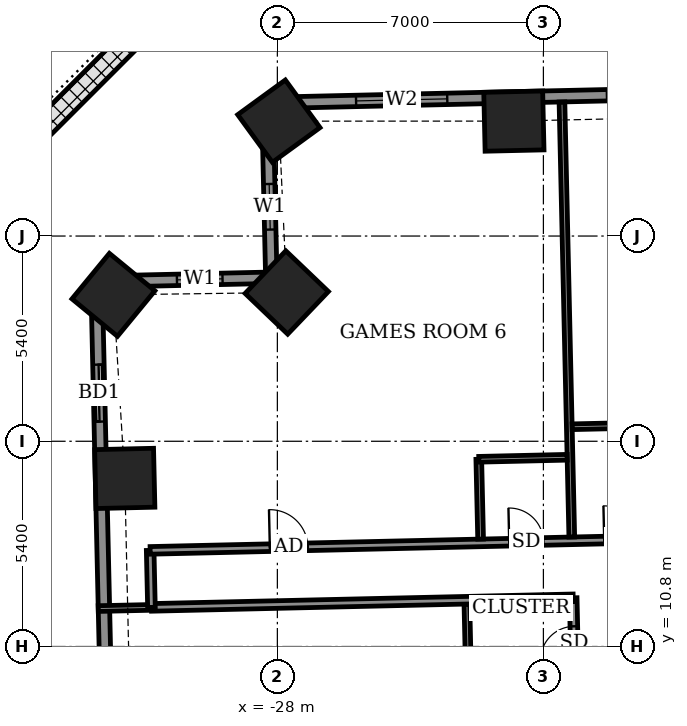
"""IFC4 building model, lengths in metres.
Left out: names, types, materials, properties, quantities, classifications, styles, units other than length and angle.
Written with IfcOpenShell. Run it as: python <this file> out.ifc"""

import sys

from ifc_helpers import new_model, si_unit, direction, frame, frame_2d, origin, origin_2d, place, context, subcontext, project, spatial, rectangle, extrude, element, fill, save


model = new_model("IFC4")
c1 = context("Model", 3, precision=1e-05, world=origin(), true_north=direction((0.0, 1.0)))
c2 = subcontext(c1, "Body", "Model", "MODEL_VIEW")
j1 = project(units=[si_unit("LENGTHUNIT", "METRE"), si_unit("PLANEANGLEUNIT", "RADIAN")], contexts=[c1])
p1 = place(None, origin())
s1 = spatial("IfcSite", under=j1, at=p1, CompositionType="ELEMENT")
p2 = place(p1, origin())
s2 = spatial("IfcBuilding", under=s1, at=p2, CompositionType="ELEMENT")
p3 = place(p2, frame((0.0, 0.0, 29.5)))
s3 = spatial("IfcBuildingStorey", under=s2, at=p3, CompositionType="ELEMENT", Elevation=29.5)
for number, where, z_axis, x_axis in (
    (1, (-21.776, 24.624, -0.55), (0.0, 0.0, 1.0), (-1.0, -0.023, 0.0)),
    (2, (-27.961, 24.623, -0.55), (0.0, 0.0, 1.0), (-0.808, -0.589, 0.0)),
    (3, (-27.753, 20.115, -0.55), (0.0, 0.0, 1.0), (-0.691, -0.723, 0.0)),
    (4, (-32.313, 20.053, -0.55), (0.0, 0.0, 1.0), (-0.635, -0.772, 0.0)),
    (5, (-32.015, 15.223, -0.55), (0.0, 0.0, 1.0), (0.023, -1.0, 0.0)),
):
    element("IfcColumn", number, at=place(p3, frame(where, z_axis=z_axis, x_axis=x_axis)), inside=s3, PredefinedType="COLUMN", context=c2, shape_type="SweptSolid", body=[
        extrude(rectangle(XDim=1.55, YDim=1.55, at=origin_2d()), origin(), (0.0, 0.0, 1.0), 4.6),
    ])
p4 = place(p3, frame((24.423, 26.298, 0.0), z_axis=(0.0, 0.0, 1.0), x_axis=(-0.999742433108, -0.022695097355, 0.0)))
e6 = element("IfcWall", 6, at=p4, inside=s3, PredefinedType="SOLIDWALL", context=c2, shape_type="SweptSolid", body=[
    extrude(rectangle(XDim=52.701, YDim=0.3, at=frame_2d((26.35, 0.0))), origin(), (0.0, 0.0, 1.0), 4.05),
])
p5 = place(p4, frame((2.757, 0.0, 0.0)))
e7 = element("IfcOpeningElement", 7, at=p5, cuts=e6, PredefinedType="OPENING", context=c2, shape_type="SweptSolid", body=[
    extrude(rectangle(XDim=1.5, YDim=2.4, at=frame_2d((0.75, 1.2))), frame((0.0, 0.16, 0.0), z_axis=(0.0, -1.0, 0.0), x_axis=(1.0, 0.0, 0.0)), (0.0, 0.0, 1.0), 0.32),
])
p6 = place(p4, frame((8.937, 0.0, 0.9)))
e8 = element("IfcOpeningElement", 8, at=p6, cuts=e6, PredefinedType="OPENING", context=c2, shape_type="SweptSolid", body=[
    extrude(rectangle(XDim=2.4, YDim=1.5, at=frame_2d((1.2, 0.75))), frame((0.0, 0.16, 0.0), z_axis=(0.0, -1.0, 0.0), x_axis=(1.0, 0.0, 0.0)), (0.0, 0.0, 1.0), 0.32),
])
p7 = place(p4, frame((16.675, 0.0, 0.0)))
e9 = element("IfcOpeningElement", 9, at=p7, cuts=e6, PredefinedType="OPENING", context=c2, shape_type="SweptSolid", body=[
    extrude(rectangle(XDim=1.5, YDim=2.4, at=frame_2d((0.75, 1.2))), frame((0.0, 0.16, 0.0), z_axis=(0.0, -1.0, 0.0), x_axis=(1.0, 0.0, 0.0)), (0.0, 0.0, 1.0), 0.32),
])
p8 = place(p4, frame((22.5, 0.0, 0.0)))
e10 = element("IfcOpeningElement", 10, at=p8, cuts=e6, PredefinedType="OPENING", context=c2, shape_type="SweptSolid", body=[
    extrude(rectangle(XDim=1.5, YDim=2.4, at=frame_2d((0.75, 1.2))), frame((0.0, 0.16, 0.0), z_axis=(0.0, -1.0, 0.0), x_axis=(1.0, 0.0, 0.0)), (0.0, 0.0, 1.0), 0.32),
])
p9 = place(p4, frame((28.113, 0.0, 0.0)))
e11 = element("IfcOpeningElement", 11, at=p9, cuts=e6, PredefinedType="OPENING", context=c2, shape_type="SweptSolid", body=[
    extrude(rectangle(XDim=1.5, YDim=2.4, at=frame_2d((0.75, 1.2))), frame((0.0, 0.16, 0.0), z_axis=(0.0, -1.0, 0.0), x_axis=(1.0, 0.0, 0.0)), (0.0, 0.0, 1.0), 0.32),
])
p10 = place(p4, frame((34.1, 0.0, 0.9)))
e12 = element("IfcOpeningElement", 12, at=p10, cuts=e6, PredefinedType="OPENING", context=c2, shape_type="SweptSolid", body=[
    extrude(rectangle(XDim=2.4, YDim=1.5, at=frame_2d((1.2, 0.75))), frame((0.0, 0.16, 0.0), z_axis=(0.0, -1.0, 0.0), x_axis=(1.0, 0.0, 0.0)), (0.0, 0.0, 1.0), 0.32),
])
p11 = place(p4, frame((41.363, 0.0, 0.9)))
e13 = element("IfcOpeningElement", 13, at=p11, cuts=e6, PredefinedType="OPENING", context=c2, shape_type="SweptSolid", body=[
    extrude(rectangle(XDim=2.4, YDim=1.5, at=frame_2d((1.2, 0.75))), frame((0.0, 0.16, 0.0), z_axis=(0.0, -1.0, 0.0), x_axis=(1.0, 0.0, 0.0)), (0.0, 0.0, 1.0), 0.32),
])
p12 = place(p4, frame((47.965, 0.0, 0.9)))
e14 = element("IfcOpeningElement", 14, at=p12, cuts=e6, PredefinedType="OPENING", context=c2, shape_type="SweptSolid", body=[
    extrude(rectangle(XDim=2.4, YDim=1.5, at=frame_2d((1.2, 0.75))), frame((0.0, 0.16, 0.0), z_axis=(0.0, -1.0, 0.0), x_axis=(1.0, 0.0, 0.0)), (0.0, 0.0, 1.0), 0.32),
])
p13 = place(p3, frame((-28.264, 25.102, 0.0), z_axis=(0.0, 0.0, 1.0), x_axis=(0.022820258049, -0.999739584003, 0.0)))
e15 = element("IfcWall", 15, at=p13, inside=s3, PredefinedType="SOLIDWALL", context=c2, shape_type="SweptSolid", body=[
    extrude(rectangle(XDim=4.6, YDim=0.3, at=frame_2d((2.3, 0.0))), origin(), (0.0, 0.0, 1.0), 3.55),
])
p14 = place(p13, frame((2.133, 0.0, 0.9)))
e16 = element("IfcOpeningElement", 16, at=p14, cuts=e15, PredefinedType="OPENING", context=c2, shape_type="SweptSolid", body=[
    extrude(rectangle(XDim=1.2, YDim=1.5, at=frame_2d((0.6, 0.75))), frame((0.0, 0.16, 0.0), z_axis=(0.0, -1.0, 0.0), x_axis=(1.0, 0.0, 0.0)), (0.0, 0.0, 1.0), 0.32),
])
p15 = place(p3, frame((-28.159, 20.503, 0.0), z_axis=(0.0, 0.0, 1.0), x_axis=(-0.999744404568, -0.02260808559, 0.0)))
e17 = element("IfcWall", 17, at=p15, inside=s3, PredefinedType="SOLIDWALL", context=c2, shape_type="SweptSolid", body=[
    extrude(rectangle(XDim=4.6, YDim=0.3, at=frame_2d((2.3, 0.0))), origin(), (0.0, 0.0, 1.0), 4.05),
])
p16 = place(p15, frame((1.284, 0.0, 0.9)))
e18 = element("IfcOpeningElement", 18, at=p16, cuts=e17, PredefinedType="OPENING", context=c2, shape_type="SweptSolid", body=[
    extrude(rectangle(XDim=1.2, YDim=1.5, at=frame_2d((0.6, 0.75))), frame((0.0, 0.16, 0.0), z_axis=(0.0, -1.0, 0.0), x_axis=(1.0, 0.0, 0.0)), (0.0, 0.0, 1.0), 0.32),
])
p17 = place(p3, frame((-32.758, 20.399, 0.0), z_axis=(0.0, 0.0, 1.0), x_axis=(0.022668485183, -0.999743036875, 0.0)))
e19 = element("IfcWall", 19, at=p17, inside=s3, PredefinedType="SOLIDWALL", context=c2, shape_type="SweptSolid", body=[
    extrude(rectangle(XDim=15.929, YDim=0.3, at=frame_2d((7.964, 0.0))), origin(), (0.0, 0.0, 1.0), 4.05),
])
p18 = place(p17, frame((2.183, 0.0, 0.0)))
e20 = element("IfcOpeningElement", 20, at=p18, cuts=e19, PredefinedType="OPENING", context=c2, shape_type="SweptSolid", body=[
    extrude(rectangle(XDim=1.5, YDim=2.4, at=frame_2d((0.75, 1.2))), frame((0.0, 0.16, 0.0), z_axis=(0.0, -1.0, 0.0), x_axis=(1.0, 0.0, 0.0)), (0.0, 0.0, 1.0), 0.32),
])
p19 = place(p17, frame((12.004, 0.0, 0.9)))
e21 = element("IfcOpeningElement", 21, at=p19, cuts=e19, PredefinedType="OPENING", context=c2, shape_type="SweptSolid", body=[
    extrude(rectangle(XDim=2.4, YDim=1.5, at=frame_2d((1.2, 0.75))), frame((0.0, 0.16, 0.0), z_axis=(0.0, -1.0, 0.0), x_axis=(1.0, 0.0, 0.0)), (0.0, 0.0, 1.0), 0.32),
])
p20 = place(p3, frame((-33.918, 7.62, 0.0), z_axis=(0.0, 0.0, 1.0), x_axis=(-0.022666865795, 0.999743073592, 0.0)))
e22 = element("IfcWall", 22, at=p20, inside=s3, PredefinedType="USERDEFINED", context=c2, shape_type="SweptSolid", body=[
    extrude(rectangle(XDim=5.999, YDim=0.55, at=frame_2d((3.0, 0.0))), origin(), (0.0, 0.0, 1.0), 0.8),
])
p21 = place(p3, frame((-35.513, 23.1, 0.0), z_axis=(0.0, 0.0, 1.0), x_axis=(0.707106781187, 0.707106781187, 0.0)))
e23 = element("IfcWall", 23, at=p21, inside=s3, PredefinedType="USERDEFINED", context=c2, shape_type="SweptSolid", body=[
    extrude(rectangle(XDim=10.201, YDim=0.55, at=frame_2d((5.1, 0.0))), origin(), (0.0, 0.0, 1.0), 0.8),
])
p22 = place(p3, frame((-19.589, -15.562, 0.0), z_axis=(0.0, 0.0, 1.0), x_axis=(-0.02267447203, 0.999742901109, 0.0)))
e24 = element("IfcWall", 24, at=p22, inside=s3, PredefinedType="PARTITIONING", context=c2, shape_type="SweptSolid", body=[
    extrude(rectangle(XDim=27.65, YDim=0.2, at=frame_2d((13.825, 0.0))), origin(), (0.0, 0.0, 1.0), 4.05),
])
p23 = place(p22, frame((22.313, 0.0, 0.0)))
e25 = element("IfcOpeningElement", 25, at=p23, cuts=e24, PredefinedType="OPENING", context=c2, shape_type="SweptSolid", body=[
    extrude(rectangle(XDim=1.0, YDim=2.1, at=frame_2d((0.5, 1.05))), frame((0.0, 0.11, 0.0), z_axis=(0.0, -1.0, 0.0), x_axis=(1.0, 0.0, 0.0)), (0.0, 0.0, 1.0), 0.22),
])
p24 = place(p22, frame((26.0, 0.0, 0.0)))
e26 = element("IfcOpeningElement", 26, at=p24, cuts=e24, PredefinedType="OPENING", context=c2, shape_type="SweptSolid", body=[
    extrude(rectangle(XDim=0.9, YDim=2.1, at=frame_2d((0.45, 1.05))), frame((0.0, 0.11, 0.0), z_axis=(0.0, -1.0, 0.0), x_axis=(1.0, 0.0, 0.0)), (0.0, 0.0, 1.0), 0.22),
])
p25 = place(p22, frame((17.817, 0.0, 0.0)))
e27 = element("IfcOpeningElement", 27, at=p25, cuts=e24, PredefinedType="OPENING", context=c2, shape_type="SweptSolid", body=[
    extrude(rectangle(XDim=1.0, YDim=2.1, at=frame_2d((0.5, 1.05))), frame((0.0, 0.11, 0.0), z_axis=(0.0, -1.0, 0.0), x_axis=(1.0, 0.0, 0.0)), (0.0, 0.0, 1.0), 0.22),
])
p26 = place(p22, frame((12.1, 0.0, 0.0)))
e28 = element("IfcOpeningElement", 28, at=p26, cuts=e24, PredefinedType="OPENING", context=c2, shape_type="SweptSolid", body=[
    extrude(rectangle(XDim=1.0, YDim=2.1, at=frame_2d((0.5, 1.05))), frame((0.0, 0.11, 0.0), z_axis=(0.0, -1.0, 0.0), x_axis=(1.0, 0.0, 0.0)), (0.0, 0.0, 1.0), 0.22),
])
p27 = place(p22, frame((14.625, 0.0, 0.0)))
e29 = element("IfcOpeningElement", 29, at=p27, cuts=e24, PredefinedType="OPENING", context=c2, shape_type="SweptSolid", body=[
    extrude(rectangle(XDim=0.9, YDim=2.1, at=frame_2d((0.45, 1.05))), frame((0.0, 0.11, 0.0), z_axis=(0.0, -1.0, 0.0), x_axis=(1.0, 0.0, 0.0)), (0.0, 0.0, 1.0), 0.22),
])
p28 = place(p22, frame((9.825, 0.0, 0.0)))
e30 = element("IfcOpeningElement", 30, at=p28, cuts=e24, PredefinedType="OPENING", context=c2, shape_type="SweptSolid", body=[
    extrude(rectangle(XDim=1.0, YDim=2.1, at=frame_2d((0.5, 1.05))), frame((0.0, 0.11, 0.0), z_axis=(0.0, -1.0, 0.0), x_axis=(1.0, 0.0, 0.0)), (0.0, 0.0, 1.0), 0.22),
])
p29 = place(p22, frame((7.475, 0.0, 0.0)))
e31 = element("IfcOpeningElement", 31, at=p29, cuts=e24, PredefinedType="OPENING", context=c2, shape_type="SweptSolid", body=[
    extrude(rectangle(XDim=0.9, YDim=2.1, at=frame_2d((0.45, 1.05))), frame((0.0, 0.11, 0.0), z_axis=(0.0, -1.0, 0.0), x_axis=(1.0, 0.0, 0.0)), (0.0, 0.0, 1.0), 0.22),
])
p30 = place(p22, frame((1.612, 0.0, 0.0)))
e32 = element("IfcOpeningElement", 32, at=p30, cuts=e24, PredefinedType="OPENING", context=c2, shape_type="SweptSolid", body=[
    extrude(rectangle(XDim=1.0, YDim=2.1, at=frame_2d((0.5, 1.05))), frame((0.0, 0.11, 0.0), z_axis=(0.0, -1.0, 0.0), x_axis=(1.0, 0.0, 0.0)), (0.0, 0.0, 1.0), 0.22),
])
p31 = place(p22, frame((4.975, 0.0, 0.0)))
e33 = element("IfcOpeningElement", 33, at=p31, cuts=e24, PredefinedType="OPENING", context=c2, shape_type="SweptSolid", body=[
    extrude(rectangle(XDim=0.9, YDim=2.1, at=frame_2d((0.45, 1.05))), frame((0.0, 0.11, 0.0), z_axis=(0.0, -1.0, 0.0), x_axis=(1.0, 0.0, 0.0)), (0.0, 0.0, 1.0), 0.22),
])
p32 = place(p3, frame((-22.961, 9.618, 0.0), z_axis=(0.0, 0.0, 1.0), x_axis=(-0.022603288534, 0.999744513037, 0.0)))
e34 = element("IfcWall", 34, at=p32, inside=s3, PredefinedType="PARTITIONING", context=c2, shape_type="SweptSolid", body=[
    extrude(rectangle(XDim=2.301, YDim=0.15, at=frame_2d((1.15, 0.0))), origin(), (0.0, 0.0, 1.0), 4.05),
])
p33 = place(p3, frame((-32.713, 11.798, 0.0), z_axis=(0.0, 0.0, 1.0), x_axis=(0.999756172383, 0.022081571112, 0.0)))
e35 = element("IfcWall", 35, at=p33, inside=s3, PredefinedType="PARTITIONING", context=c2, shape_type="SweptSolid", body=[
    extrude(rectangle(XDim=1.404, YDim=0.15, at=frame_2d((0.702, 0.0))), origin(), (0.0, 0.0, 1.0), 3.55),
])
p34 = place(p3, frame((-31.313, 11.829, 0.0), z_axis=(0.0, 0.0, 1.0), x_axis=(0.999742346277, 0.022698921993, 0.0)))
e36 = element("IfcWall", 36, at=p34, inside=s3, PredefinedType="PARTITIONING", context=c2, shape_type="SweptSolid", body=[
    extrude(rectangle(XDim=11.1, YDim=0.2, at=frame_2d((5.55, 0.0))), origin(), (0.0, 0.0, 1.0), 4.05),
])
p35 = place(p3, frame((-31.313, 11.829, 0.0), z_axis=(0.0, 0.0, 1.0), x_axis=(-0.022617910375, 0.999744182344, 0.0)))
e37 = element("IfcWall", 37, at=p35, inside=s3, PredefinedType="PARTITIONING", context=c2, shape_type="SweptSolid", body=[
    extrude(rectangle(XDim=1.5, YDim=0.2, at=frame_2d((0.75, 0.0))), origin(), (0.0, 0.0, 1.0), 4.05),
])
p36 = place(p3, frame((-31.347, 13.329, 0.0), z_axis=(0.0, 0.0, 1.0), x_axis=(0.999742613079, 0.022687168058, 0.0)))
e38 = element("IfcWall", 38, at=p36, inside=s3, PredefinedType="PARTITIONING", context=c2, shape_type="SweptSolid", body=[
    extrude(rectangle(XDim=58.799, YDim=0.2, at=frame_2d((29.399, 0.0))), origin(), (0.0, 0.0, 1.0), 4.05),
])
p37 = place(p36, frame((55.05, 0.0, 0.0)))
e39 = element("IfcOpeningElement", 39, at=p37, cuts=e38, PredefinedType="OPENING", context=c2, shape_type="SweptSolid", body=[
    extrude(rectangle(XDim=1.0, YDim=2.1, at=frame_2d((0.5, 1.05))), frame((0.0, 0.11, 0.0), z_axis=(0.0, -1.0, 0.0), x_axis=(1.0, 0.0, 0.0)), (0.0, 0.0, 1.0), 0.22),
])
p38 = place(p36, frame((49.15, 0.0, 0.0)))
e40 = element("IfcOpeningElement", 40, at=p38, cuts=e38, PredefinedType="OPENING", context=c2, shape_type="SweptSolid", body=[
    extrude(rectangle(XDim=0.9, YDim=2.1, at=frame_2d((0.45, 1.05))), frame((0.0, 0.11, 0.0), z_axis=(0.0, -1.0, 0.0), x_axis=(1.0, 0.0, 0.0)), (0.0, 0.0, 1.0), 0.22),
])
p39 = place(p36, frame((42.55, 0.0, 0.0)))
e41 = element("IfcOpeningElement", 41, at=p39, cuts=e38, PredefinedType="OPENING", context=c2, shape_type="SweptSolid", body=[
    extrude(rectangle(XDim=1.0, YDim=2.1, at=frame_2d((0.5, 1.05))), frame((0.0, 0.11, 0.0), z_axis=(0.0, -1.0, 0.0), x_axis=(1.0, 0.0, 0.0)), (0.0, 0.0, 1.0), 0.22),
])
p40 = place(p36, frame((46.55, 0.0, 0.0)))
e42 = element("IfcOpeningElement", 42, at=p40, cuts=e38, PredefinedType="OPENING", context=c2, shape_type="SweptSolid", body=[
    extrude(rectangle(XDim=0.9, YDim=2.1, at=frame_2d((0.45, 1.05))), frame((0.0, 0.11, 0.0), z_axis=(0.0, -1.0, 0.0), x_axis=(1.0, 0.0, 0.0)), (0.0, 0.0, 1.0), 0.22),
])
p41 = place(p36, frame((38.625, 0.0, 0.0)))
e43 = element("IfcOpeningElement", 43, at=p41, cuts=e38, PredefinedType="OPENING", context=c2, shape_type="SweptSolid", body=[
    extrude(rectangle(XDim=0.9, YDim=2.1, at=frame_2d((0.45, 1.05))), frame((0.0, 0.11, 0.0), z_axis=(0.0, -1.0, 0.0), x_axis=(1.0, 0.0, 0.0)), (0.0, 0.0, 1.0), 0.22),
])
p42 = place(p36, frame((31.15, 0.0, 0.0)))
e44 = element("IfcOpeningElement", 44, at=p42, cuts=e38, PredefinedType="OPENING", context=c2, shape_type="SweptSolid", body=[
    extrude(rectangle(XDim=0.9, YDim=2.1, at=frame_2d((0.45, 1.05))), frame((0.0, 0.11, 0.0), z_axis=(0.0, -1.0, 0.0), x_axis=(1.0, 0.0, 0.0)), (0.0, 0.0, 1.0), 0.22),
])
p43 = place(p36, frame((28.475, 0.0, 0.0)))
e45 = element("IfcOpeningElement", 45, at=p43, cuts=e38, PredefinedType="OPENING", context=c2, shape_type="SweptSolid", body=[
    extrude(rectangle(XDim=0.9, YDim=2.1, at=frame_2d((0.45, 1.05))), frame((0.0, 0.11, 0.0), z_axis=(0.0, -1.0, 0.0), x_axis=(1.0, 0.0, 0.0)), (0.0, 0.0, 1.0), 0.22),
])
p44 = place(p36, frame((21.6, 0.0, 0.0)))
e46 = element("IfcOpeningElement", 46, at=p44, cuts=e38, PredefinedType="OPENING", context=c2, shape_type="SweptSolid", body=[
    extrude(rectangle(XDim=1.0, YDim=2.1, at=frame_2d((0.5, 1.05))), frame((0.0, 0.11, 0.0), z_axis=(0.0, -1.0, 0.0), x_axis=(1.0, 0.0, 0.0)), (0.0, 0.0, 1.0), 0.22),
])
p45 = place(p36, frame((15.85, 0.0, 0.0)))
e47 = element("IfcOpeningElement", 47, at=p45, cuts=e38, PredefinedType="OPENING", context=c2, shape_type="SweptSolid", body=[
    extrude(rectangle(XDim=1.0, YDim=2.1, at=frame_2d((0.5, 1.05))), frame((0.0, 0.11, 0.0), z_axis=(0.0, -1.0, 0.0), x_axis=(1.0, 0.0, 0.0)), (0.0, 0.0, 1.0), 0.22),
])
p46 = place(p36, frame((11.95, 0.0, 0.0)))
e48 = element("IfcOpeningElement", 48, at=p46, cuts=e38, PredefinedType="OPENING", context=c2, shape_type="SweptSolid", body=[
    extrude(rectangle(XDim=0.9, YDim=2.1, at=frame_2d((0.45, 1.05))), frame((0.0, 0.11, 0.0), z_axis=(0.0, -1.0, 0.0), x_axis=(1.0, 0.0, 0.0)), (0.0, 0.0, 1.0), 0.22),
])
p47 = place(p36, frame((3.15, 0.0, 0.0)))
e49 = element("IfcOpeningElement", 49, at=p47, cuts=e38, PredefinedType="OPENING", context=c2, shape_type="SweptSolid", body=[
    extrude(rectangle(XDim=1.0, YDim=2.1, at=frame_2d((0.5, 1.05))), frame((0.0, 0.11, 0.0), z_axis=(0.0, -1.0, 0.0), x_axis=(1.0, 0.0, 0.0)), (0.0, 0.0, 1.0), 0.22),
])
p48 = place(p36, frame((9.45, 0.0, 0.0)))
e50 = element("IfcOpeningElement", 50, at=p48, cuts=e38, PredefinedType="OPENING", context=c2, shape_type="SweptSolid", body=[
    extrude(rectangle(XDim=0.9, YDim=2.1, at=frame_2d((0.45, 1.05))), frame((0.0, 0.11, 0.0), z_axis=(0.0, -1.0, 0.0), x_axis=(1.0, 0.0, 0.0)), (0.0, 0.0, 1.0), 0.22),
])
p49 = place(p3, frame((-22.652, 13.626, 0.0), z_axis=(0.0, 0.0, 1.0), x_axis=(-0.022779486249, 0.999740513837, 0.0)))
e51 = element("IfcWall", 51, at=p49, inside=s3, PredefinedType="PARTITIONING", context=c2, shape_type="SweptSolid", body=[
    extrude(rectangle(XDim=2.101, YDim=0.15, at=frame_2d((1.05, 0.0))), origin(), (0.0, 0.0, 1.0), 4.05),
])
p50 = place(p3, frame((-20.253, 13.681, 0.0), z_axis=(0.0, 0.0, 1.0), x_axis=(-0.022623082162, 0.999744065325, 0.0)))
e52 = element("IfcWall", 52, at=p50, inside=s3, PredefinedType="PARTITIONING", context=c2, shape_type="SweptSolid", body=[
    extrude(rectangle(XDim=11.45, YDim=0.15, at=frame_2d((5.725, 0.0))), origin(), (0.0, 0.0, 1.0), 3.55),
])
p51 = place(p3, frame((-22.7, 15.726, 0.0), z_axis=(0.0, 0.0, 1.0), x_axis=(0.999740478815, 0.022781023197, 0.0)))
e53 = element("IfcWall", 53, at=p51, inside=s3, PredefinedType="PARTITIONING", context=c2, shape_type="SweptSolid", body=[
    extrude(rectangle(XDim=2.325, YDim=0.15, at=frame_2d((1.163, 0.0))), origin(), (0.0, 0.0, 1.0), 4.05),
])
p52 = place(p3, frame((-20.243, 16.582, 0.0), z_axis=(0.0, 0.0, 1.0), x_axis=(0.9997461113, 0.022532486354, 0.0)))
e54 = element("IfcWall", 54, at=p52, inside=s3, PredefinedType="PARTITIONING", context=c2, shape_type="SweptSolid", body=[
    extrude(rectangle(XDim=2.525, YDim=0.15, at=frame_2d((1.262, 0.0))), origin(), (0.0, 0.0, 1.0), 4.05),
])
p53 = place(p11, origin())
e55 = element("IfcWindow", 55, at=p53, inside=s3, PartitioningType="DOUBLE_PANEL_VERTICAL", PredefinedType="WINDOW", context=c2, shape_type="SweptSolid", body=[
    extrude(rectangle(XDim=2.4, YDim=1.5, at=frame_2d((1.2, 0.75))), frame((0.0, 0.03, 0.0), z_axis=(0.0, -1.0, 0.0), x_axis=(1.0, 0.0, 0.0)), (0.0, 0.0, 1.0), 0.06),
])
fill(e13, e55)
p54 = place(p12, origin())
e56 = element("IfcWindow", 56, at=p54, inside=s3, PartitioningType="DOUBLE_PANEL_VERTICAL", PredefinedType="WINDOW", context=c2, shape_type="SweptSolid", body=[
    extrude(rectangle(XDim=2.4, YDim=1.5, at=frame_2d((1.2, 0.75))), frame((0.0, 0.03, 0.0), z_axis=(0.0, -1.0, 0.0), x_axis=(1.0, 0.0, 0.0)), (0.0, 0.0, 1.0), 0.06),
])
fill(e14, e56)
p55 = place(p14, origin())
e57 = element("IfcWindow", 57, at=p55, inside=s3, PartitioningType="SINGLE_PANEL", PredefinedType="WINDOW", context=c2, shape_type="SweptSolid", body=[
    extrude(rectangle(XDim=1.2, YDim=1.5, at=frame_2d((0.6, 0.75))), frame((0.0, 0.03, 0.0), z_axis=(0.0, -1.0, 0.0), x_axis=(1.0, 0.0, 0.0)), (0.0, 0.0, 1.0), 0.06),
])
fill(e16, e57)
p56 = place(p16, origin())
e58 = element("IfcWindow", 58, at=p56, inside=s3, PartitioningType="SINGLE_PANEL", PredefinedType="WINDOW", context=c2, shape_type="SweptSolid", body=[
    extrude(rectangle(XDim=1.2, YDim=1.5, at=frame_2d((0.6, 0.75))), frame((0.0, 0.03, 0.0), z_axis=(0.0, -1.0, 0.0), x_axis=(1.0, 0.0, 0.0)), (0.0, 0.0, 1.0), 0.06),
])
fill(e18, e58)
p57 = place(p18, origin())
e59 = element("IfcDoor", 59, at=p57, inside=s3, OperationType="SLIDING_TO_LEFT", PredefinedType="DOOR", context=c2, shape_type="SweptSolid", body=[
    extrude(rectangle(XDim=1.5, YDim=2.4, at=frame_2d((0.75, 1.2))), frame((0.0, 0.025, 0.0), z_axis=(0.0, -1.0, 0.0), x_axis=(1.0, 0.0, 0.0)), (0.0, 0.0, 1.0), 0.05),
])
fill(e20, e59)
p58 = place(p46, origin())
e60 = element("IfcDoor", 60, at=p58, inside=s3, OperationType="SINGLE_SWING_LEFT", PredefinedType="DOOR", context=c2, shape_type="SweptSolid", body=[
    extrude(rectangle(XDim=0.9, YDim=2.1, at=frame_2d((0.45, 1.05))), frame((0.0, 0.025, 0.0), z_axis=(0.0, -1.0, 0.0), x_axis=(1.0, 0.0, 0.0)), (0.0, 0.0, 1.0), 0.05),
])
fill(e48, e60)
p59 = place(p47, origin())
e61 = element("IfcDoor", 61, at=p59, inside=s3, OperationType="SINGLE_SWING_RIGHT", PredefinedType="DOOR", context=c2, shape_type="SweptSolid", body=[
    extrude(rectangle(XDim=1.0, YDim=2.1, at=frame_2d((0.5, 1.05))), frame((0.0, 0.025, 0.0), z_axis=(0.0, -1.0, 0.0), x_axis=(1.0, 0.0, 0.0)), (0.0, 0.0, 1.0), 0.05),
])
fill(e49, e61)
p60 = place(p48, origin())
e62 = element("IfcDoor", 62, at=p60, inside=s3, OperationType="SINGLE_SWING_RIGHT", PredefinedType="DOOR", context=c2, shape_type="SweptSolid", body=[
    extrude(rectangle(XDim=0.9, YDim=2.1, at=frame_2d((0.45, 1.05))), frame((0.0, 0.025, 0.0), z_axis=(0.0, -1.0, 0.0), x_axis=(1.0, 0.0, 0.0)), (0.0, 0.0, 1.0), 0.05),
])
fill(e50, e62)
p61 = place(p24, origin())
e63 = element("IfcDoor", 63, at=p61, inside=s3, OperationType="SINGLE_SWING_LEFT", PredefinedType="DOOR", context=c2, shape_type="SweptSolid", body=[
    extrude(rectangle(XDim=0.9, YDim=2.1, at=frame_2d((0.45, 1.05))), frame((0.0, 0.025, 0.0), z_axis=(0.0, -1.0, 0.0), x_axis=(1.0, 0.0, 0.0)), (0.0, 0.0, 1.0), 0.05),
])
fill(e26, e63)
save(model, sys.argv[1])
